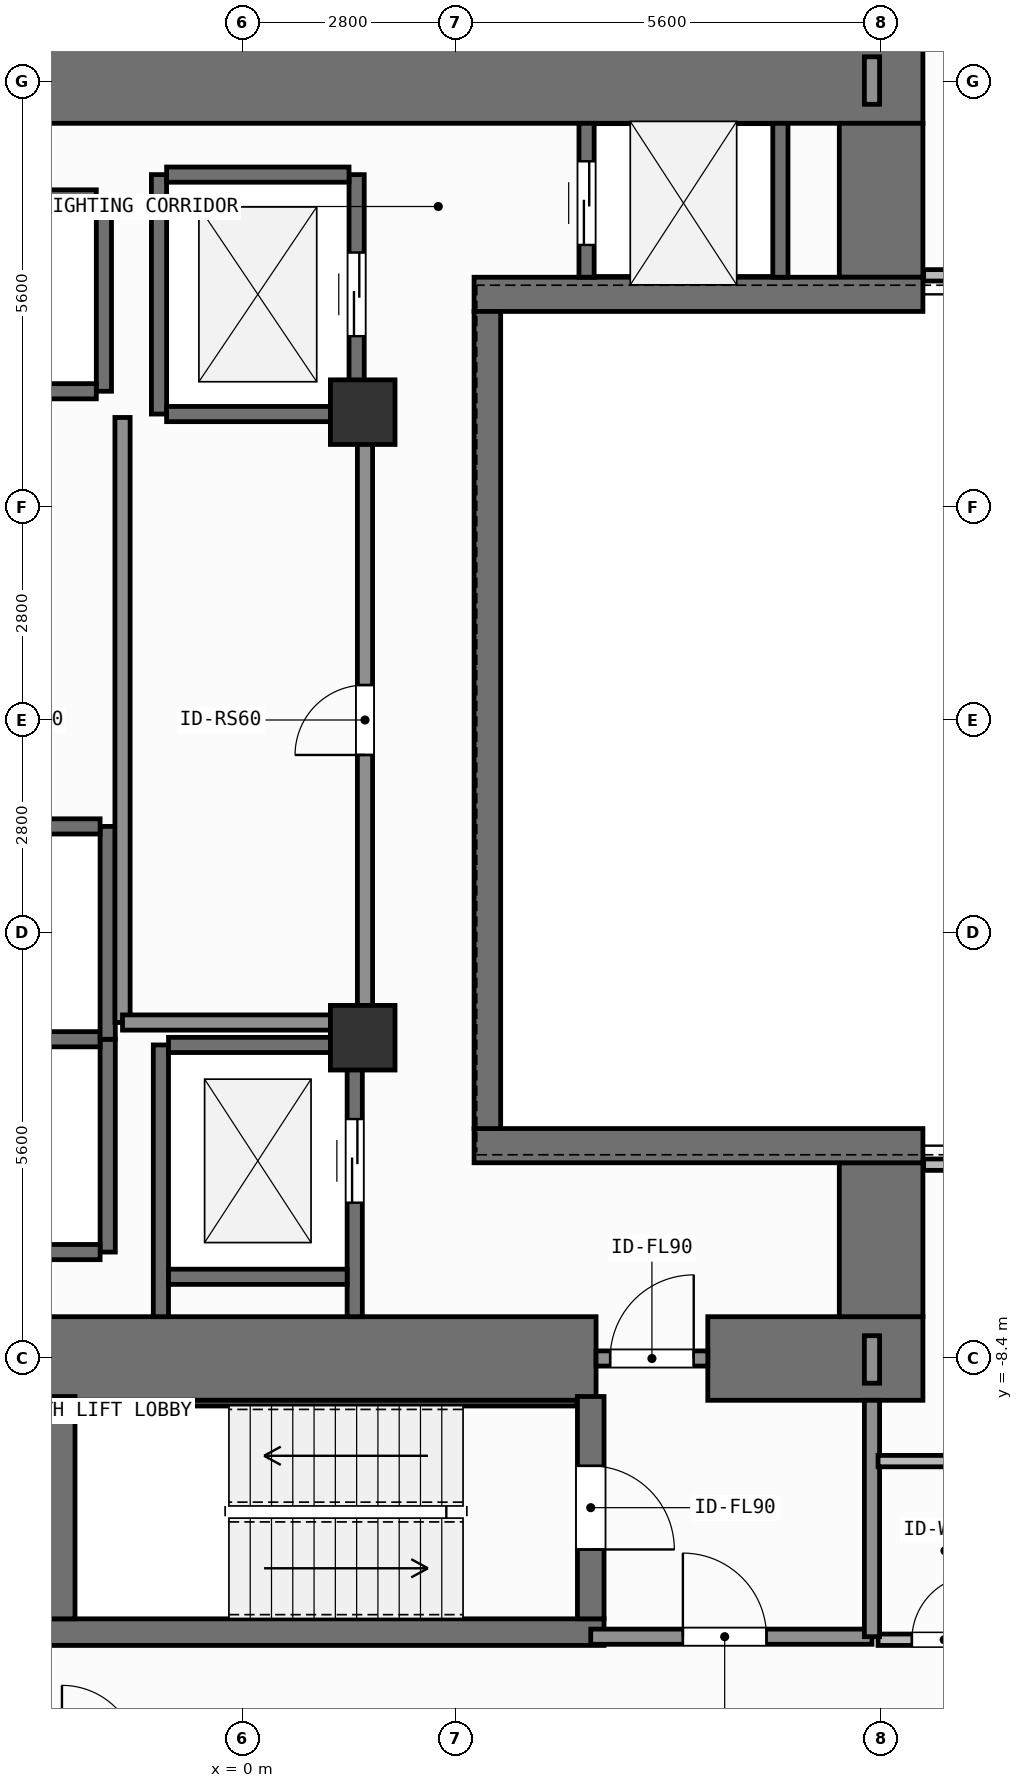
"""IFC4 building model, lengths in metres.
Left out: names, types, materials, properties, quantities, classifications, styles, units other than length and angle.
Written with IfcOpenShell. Run it as: python <this file> out.ifc"""

import sys

from ifc_helpers import new_model, si_unit, direction, frame, frame_2d, origin, origin_2d, place, context, subcontext, project, spatial, rectangle, extrude, element, fill, save


model = new_model("IFC4")
c1 = context("Model", 3, precision=1e-05, world=origin(), true_north=direction((0.0, 1.0)))
c2 = subcontext(c1, "Body", "Model", "MODEL_VIEW")
j1 = project(units=[si_unit("LENGTHUNIT", "METRE"), si_unit("PLANEANGLEUNIT", "RADIAN")], contexts=[c1])
p1 = place(None, origin())
s1 = spatial("IfcSite", under=j1, at=p1, CompositionType="ELEMENT")
p2 = place(p1, origin())
s2 = spatial("IfcBuilding", under=s1, at=p2, CompositionType="ELEMENT")
p3 = place(p2, frame((0.0, 0.0, 61.8)))
s3 = spatial("IfcBuildingStorey", under=s2, at=p3, CompositionType="ELEMENT", Elevation=61.8)
p4 = place(p3, frame((-2.62, -8.4, 0.0), z_axis=(0.0, 0.0, 1.0), x_axis=(1.0, 0.0, 0.0)))
e1 = element("IfcWall", 1, at=p4, inside=s3, PredefinedType="SHEAR", context=c2, shape_type="SweptSolid", body=[
    extrude(rectangle(XDim=7.27, YDim=1.1, at=frame_2d((3.635, 0.0))), origin(), (0.0, 0.0, 1.0), 3.9),
])
p5 = place(p3, frame((6.12, -8.4, 0.0), z_axis=(0.0, 0.0, 1.0), x_axis=(1.0, 0.0, 0.0)))
e2 = element("IfcWall", 2, at=p5, inside=s3, PredefinedType="SHEAR", context=c2, shape_type="SweptSolid", body=[
    extrude(rectangle(XDim=2.83, YDim=1.1, at=frame_2d((1.415, 0.0))), origin(), (0.0, 0.0, 1.0), 3.9),
])
p6 = place(p3, frame((-7.55, 8.4, 0.0), z_axis=(0.0, 0.0, 1.0), x_axis=(1.0, 0.0, 0.0)))
e3 = element("IfcWall", 3, at=p6, inside=s3, PredefinedType="SHEAR", context=c2, shape_type="SweptSolid", body=[
    extrude(rectangle(XDim=16.5, YDim=1.1, at=frame_2d((8.25, 0.0))), origin(), (0.0, 0.0, 1.0), 3.9),
])
for number, where, z_axis, x_axis in (
    (4, (8.4, -7.85, 0.0), (0.0, 0.0, 1.0), (0.0, 1.0, 0.0)),
    (5, (8.4, 5.825, 0.0), (0.0, 0.0, 1.0), (0.0, 1.0, 0.0)),
):
    element("IfcWall", number, at=place(p3, frame(where, z_axis=z_axis, x_axis=x_axis)), inside=s3, PredefinedType="SHEAR", context=c2, shape_type="SweptSolid", body=[
        extrude(rectangle(XDim=2.025, YDim=1.1, at=frame_2d((1.013, 0.0))), origin(), (0.0, 0.0, 1.0), 3.9),
    ])
for number, where, z_axis, x_axis in (
    (6, (3.045, -5.6, 0.0), (0.0, 0.0, 1.0), (1.0, 0.0, 0.0)),
    (7, (3.045, 5.6, 0.0), (0.0, 0.0, 1.0), (1.0, 0.0, 0.0)),
):
    element("IfcWall", number, at=place(p3, frame(where, z_axis=z_axis, x_axis=x_axis)), inside=s3, PredefinedType="SHEAR", context=c2, shape_type="SweptSolid", body=[
        extrude(rectangle(XDim=5.905, YDim=0.45, at=frame_2d((2.953, 0.0))), origin(), (0.0, 0.0, 1.0), 3.9),
    ])
p7 = place(p3, frame((3.22, -5.375, 0.0), z_axis=(0.0, 0.0, 1.0), x_axis=(0.0, 1.0, 0.0)))
e8 = element("IfcWall", 8, at=p7, inside=s3, PredefinedType="SHEAR", context=c2, shape_type="SweptSolid", body=[
    extrude(rectangle(XDim=10.75, YDim=0.35, at=frame_2d((5.375, 0.0))), origin(), (0.0, 0.0, 1.0), 3.9),
])
p8 = place(p3, frame((-2.555, -12.0, 0.0), z_axis=(0.0, 0.0, 1.0), x_axis=(1.0, 0.0, 0.0)))
e9 = element("IfcWall", 9, at=p8, inside=s3, PredefinedType="SHEAR", context=c2, shape_type="SweptSolid", body=[
    extrude(rectangle(XDim=7.31, YDim=0.35, at=frame_2d((3.655, 0.0))), origin(), (0.0, 0.0, 1.0), 3.9),
])
p9 = place(p3, frame((-2.2, -8.988, 0.0), z_axis=(0.0, 0.0, 1.0), x_axis=(1.0, 0.0, 0.0)))
e10 = element("IfcWall", 10, at=p9, inside=s3, PredefinedType="SHEAR", context=c2, shape_type="SweptSolid", body=[
    extrude(rectangle(XDim=6.6, YDim=0.075, at=frame_2d((3.3, 0.0))), origin(), (0.0, 0.0, 1.0), 3.9),
])
p10 = place(p3, frame((-2.38, -11.825, 0.0), z_axis=(0.0, 0.0, 1.0), x_axis=(0.0, 1.0, 0.0)))
e11 = element("IfcWall", 11, at=p10, inside=s3, PredefinedType="SHEAR", context=c2, shape_type="SweptSolid", body=[
    extrude(rectangle(XDim=2.925, YDim=0.35, at=frame_2d((1.462, 0.0))), origin(), (0.0, 0.0, 1.0), 3.9),
])
p11 = place(p3, frame((4.58, -8.9, 0.0), z_axis=(0.0, 0.0, 1.0), x_axis=(0.0, -1.0, 0.0)))
e12 = element("IfcWall", 12, at=p11, inside=s3, PredefinedType="SHEAR", context=c2, shape_type="SweptSolid", body=[
    extrude(rectangle(XDim=2.925, YDim=0.35, at=frame_2d((1.462, 0.0))), origin(), (0.0, 0.0, 1.0), 3.9),
])
p12 = place(p11, frame((0.913, 0.0, 0.0)))
e13 = element("IfcOpeningElement", 13, at=p12, cuts=e12, PredefinedType="OPENING", context=c2, shape_type="SweptSolid", body=[
    extrude(rectangle(XDim=1.1, YDim=2.15, at=frame_2d((0.55, 1.075))), frame((0.0, 0.185, 0.0), z_axis=(0.0, -1.0, 0.0), x_axis=(1.0, 0.0, 0.0)), (0.0, 0.0, 1.0), 0.37),
])
for number, where, z_axis, x_axis in (
    (14, (1.58, -4.18, 0.0), (0.0, 0.0, 1.0), (1.0, 0.0, 0.0)),
    (15, (1.58, 4.05, 0.0), (0.0, 0.0, 1.0), (1.0, 0.0, 0.0)),
):
    element("IfcColumn", number, at=place(p3, frame(where, z_axis=z_axis, x_axis=x_axis)), inside=s3, PredefinedType="COLUMN", context=c2, shape_type="SweptSolid", body=[
        extrude(rectangle(XDim=0.85, YDim=0.85, at=origin_2d()), origin(), (0.0, 0.0, 1.0), 3.9),
    ])
p13 = place(p3, frame((-1.825, 4.325, 0.0), z_axis=(0.0, 0.0, 1.0), x_axis=(0.0, 1.0, 0.0)))
e16 = element("IfcWall", 16, at=p13, inside=s3, PredefinedType="SHEAR", context=c2, shape_type="SweptSolid", body=[
    extrude(rectangle(XDim=2.55, YDim=0.2, at=frame_2d((1.275, 0.0))), origin(), (0.0, 0.0, 1.0), 3.68),
])
for number, where, z_axis, x_axis in (
    (17, (-4.275, 4.325, 0.0), (0.0, 0.0, 1.0), (1.0, 0.0, 0.0)),
    (18, (-4.275, 6.875, 0.0), (0.0, 0.0, 1.0), (1.0, 0.0, 0.0)),
):
    element("IfcWall", number, at=place(p3, frame(where, z_axis=z_axis, x_axis=x_axis)), inside=s3, PredefinedType="SHEAR", context=c2, shape_type="SweptSolid", body=[
        extrude(rectangle(XDim=2.35, YDim=0.2, at=frame_2d((1.175, 0.0))), origin(), (0.0, 0.0, 1.0), 3.68),
    ])
p14 = place(p3, frame((-1.775, -7.0, 0.0), z_axis=(0.0, 0.0, 1.0), x_axis=(0.0, 1.0, 0.0)))
e19 = element("IfcWall", 19, at=p14, inside=s3, PredefinedType="SHEAR", context=c2, shape_type="SweptSolid", body=[
    extrude(rectangle(XDim=2.8, YDim=0.2, at=frame_2d((1.4, 0.0))), origin(), (0.0, 0.0, 1.0), 3.68),
])
for number, where, z_axis, x_axis in (
    (20, (-4.325, -7.0, 0.0), (0.0, 0.0, 1.0), (1.0, 0.0, 0.0)),
    (21, (-4.325, -4.2, 0.0), (0.0, 0.0, 1.0), (1.0, 0.0, 0.0)),
):
    element("IfcWall", number, at=place(p3, frame(where, z_axis=z_axis, x_axis=x_axis)), inside=s3, PredefinedType="SHEAR", context=c2, shape_type="SweptSolid", body=[
        extrude(rectangle(XDim=2.45, YDim=0.2, at=frame_2d((1.225, 0.0))), origin(), (0.0, 0.0, 1.0), 3.68),
    ])
p15 = place(p3, frame((-1.775, -4.2, 0.0), z_axis=(0.0, 0.0, 1.0), x_axis=(0.0, 1.0, 0.0)))
e22 = element("IfcWall", 22, at=p15, inside=s3, PredefinedType="SHEAR", context=c2, shape_type="SweptSolid", body=[
    extrude(rectangle(XDim=2.8, YDim=0.2, at=frame_2d((1.4, 0.0))), origin(), (0.0, 0.0, 1.0), 3.68),
])
p16 = place(p3, frame((-4.325, -1.4, 0.0), z_axis=(0.0, 0.0, 1.0), x_axis=(1.0, 0.0, 0.0)))
e23 = element("IfcWall", 23, at=p16, inside=s3, PredefinedType="SHEAR", context=c2, shape_type="SweptSolid", body=[
    extrude(rectangle(XDim=2.45, YDim=0.2, at=frame_2d((1.225, 0.0))), origin(), (0.0, 0.0, 1.0), 3.68),
])
p17 = place(p3, frame((-1.1, 4.025, 0.0), z_axis=(0.0, 0.0, 1.0), x_axis=(0.0, 1.0, 0.0)))
e24 = element("IfcWall", 24, at=p17, inside=s3, PredefinedType="SHEAR", context=c2, shape_type="SweptSolid", body=[
    extrude(rectangle(XDim=3.15, YDim=0.2, at=frame_2d((1.575, 0.0))), origin(), (0.0, 0.0, 1.0), 3.68),
])
p18 = place(p3, frame((1.5, 4.025, 0.0), z_axis=(0.0, 0.0, 1.0), x_axis=(0.0, 1.0, 0.0)))
e25 = element("IfcWall", 25, at=p18, inside=s3, PredefinedType="SHEAR", context=c2, shape_type="SweptSolid", body=[
    extrude(rectangle(XDim=3.15, YDim=0.2, at=frame_2d((1.575, 0.0))), origin(), (0.0, 0.0, 1.0), 3.68),
])
p19 = place(p18, frame((1.025, 0.0, 0.0)))
e26 = element("IfcOpeningElement", 26, at=p19, cuts=e25, PredefinedType="OPENING", context=c2, shape_type="SweptSolid", body=[
    extrude(rectangle(XDim=1.1, YDim=2.2, at=frame_2d((0.55, 1.1))), frame((0.0, 0.11, 0.0), z_axis=(0.0, -1.0, 0.0), x_axis=(1.0, 0.0, 0.0)), (0.0, 0.0, 1.0), 0.22),
])
for number, where, z_axis, x_axis in (
    (27, (-1.0, 4.025, 0.0), (0.0, 0.0, 1.0), (1.0, 0.0, 0.0)),
    (28, (-1.0, 7.175, 0.0), (0.0, 0.0, 1.0), (1.0, 0.0, 0.0)),
):
    element("IfcWall", number, at=place(p3, frame(where, z_axis=z_axis, x_axis=x_axis)), inside=s3, PredefinedType="SHEAR", context=c2, shape_type="SweptSolid", body=[
        extrude(rectangle(XDim=2.4, YDim=0.2, at=frame_2d((1.2, 0.0))), origin(), (0.0, 0.0, 1.0), 3.68),
    ])
p20 = place(p3, frame((-1.075, -7.85, 0.0), z_axis=(0.0, 0.0, 1.0), x_axis=(0.0, 1.0, 0.0)))
e29 = element("IfcWall", 29, at=p20, inside=s3, PredefinedType="SHEAR", context=c2, shape_type="SweptSolid", body=[
    extrude(rectangle(XDim=3.575, YDim=0.2, at=frame_2d((1.788, 0.0))), origin(), (0.0, 0.0, 1.0), 3.68),
])
p21 = place(p3, frame((1.475, -7.85, 0.0), z_axis=(0.0, 0.0, 1.0), x_axis=(0.0, 1.0, 0.0)))
e30 = element("IfcWall", 30, at=p21, inside=s3, PredefinedType="SHEAR", context=c2, shape_type="SweptSolid", body=[
    extrude(rectangle(XDim=3.575, YDim=0.2, at=frame_2d((1.788, 0.0))), origin(), (0.0, 0.0, 1.0), 3.68),
])
p22 = place(p21, frame((1.5, 0.0, 0.0)))
e31 = element("IfcOpeningElement", 31, at=p22, cuts=e30, PredefinedType="OPENING", context=c2, shape_type="SweptSolid", body=[
    extrude(rectangle(XDim=1.1, YDim=2.2, at=frame_2d((0.55, 1.1))), frame((0.0, 0.11, 0.0), z_axis=(0.0, -1.0, 0.0), x_axis=(1.0, 0.0, 0.0)), (0.0, 0.0, 1.0), 0.22),
])
for number, where, z_axis, x_axis in (
    (32, (-0.975, -7.325, 0.0), (0.0, 0.0, 1.0), (1.0, 0.0, 0.0)),
    (33, (-0.975, -4.275, 0.0), (0.0, 0.0, 1.0), (1.0, 0.0, 0.0)),
):
    element("IfcWall", number, at=place(p3, frame(where, z_axis=z_axis, x_axis=x_axis)), inside=s3, PredefinedType="SHEAR", context=c2, shape_type="SweptSolid", body=[
        extrude(rectangle(XDim=2.35, YDim=0.2, at=frame_2d((1.175, 0.0))), origin(), (0.0, 0.0, 1.0), 3.68),
    ])
p23 = place(p3, frame((4.525, 5.825, 0.0), z_axis=(0.0, 0.0, 1.0), x_axis=(0.0, 1.0, 0.0)))
e34 = element("IfcWall", 34, at=p23, inside=s3, PredefinedType="SHEAR", context=c2, shape_type="SweptSolid", body=[
    extrude(rectangle(XDim=2.025, YDim=0.2, at=frame_2d((1.013, 0.0))), origin(), (0.0, 0.0, 1.0), 3.68),
])
p24 = place(p23, frame((0.425, 0.0, 0.0)))
e35 = element("IfcOpeningElement", 35, at=p24, cuts=e34, PredefinedType="OPENING", context=c2, shape_type="SweptSolid", body=[
    extrude(rectangle(XDim=1.1, YDim=2.2, at=frame_2d((0.55, 1.1))), frame((0.0, 0.11, 0.0), z_axis=(0.0, -1.0, 0.0), x_axis=(1.0, 0.0, 0.0)), (0.0, 0.0, 1.0), 0.22),
])
p25 = place(p3, frame((7.075, 5.825, 0.0), z_axis=(0.0, 0.0, 1.0), x_axis=(0.0, 1.0, 0.0)))
e36 = element("IfcWall", 36, at=p25, inside=s3, PredefinedType="SHEAR", context=c2, shape_type="SweptSolid", body=[
    extrude(rectangle(XDim=2.025, YDim=0.2, at=frame_2d((1.013, 0.0))), origin(), (0.0, 0.0, 1.0), 3.68),
])
p26 = place(p3, frame((4.58, -12.06, 0.0), z_axis=(0.0, 0.0, 1.0), x_axis=(1.0, 0.0, 0.0)))
e37 = element("IfcWall", 37, at=p26, inside=s3, PredefinedType="SOLIDWALL", context=c2, shape_type="SweptSolid", body=[
    extrude(rectangle(XDim=3.7, YDim=0.2, at=frame_2d((1.85, 0.0))), origin(), (0.0, 0.0, 1.0), 3.68),
])
p27 = place(p26, frame((1.212, 0.0, 0.0)))
e38 = element("IfcOpeningElement", 38, at=p27, cuts=e37, PredefinedType="OPENING", context=c2, shape_type="SweptSolid", body=[
    extrude(rectangle(XDim=1.1, YDim=2.15, at=frame_2d((0.55, 1.075))), frame((0.0, 0.11, 0.0), z_axis=(0.0, -1.0, 0.0), x_axis=(1.0, 0.0, 0.0)), (0.0, 0.0, 1.0), 0.22),
])
p28 = place(p3, frame((4.65, -8.4, 0.0), z_axis=(0.0, 0.0, 1.0), x_axis=(1.0, 0.0, 0.0)))
e39 = element("IfcWall", 39, at=p28, inside=s3, PredefinedType="SOLIDWALL", context=c2, shape_type="SweptSolid", body=[
    extrude(rectangle(XDim=1.47, YDim=0.2, at=frame_2d((0.735, 0.0))), origin(), (0.0, 0.0, 1.0), 2.72),
])
p29 = place(p28, frame((0.185, 0.0, 0.0)))
e40 = element("IfcOpeningElement", 40, at=p29, cuts=e39, PredefinedType="OPENING", context=c2, shape_type="SweptSolid", body=[
    extrude(rectangle(XDim=1.1, YDim=2.15, at=frame_2d((0.55, 1.075))), frame((0.0, 0.11, 0.0), z_axis=(0.0, -1.0, 0.0), x_axis=(1.0, 0.0, 0.0)), (0.0, 0.0, 1.0), 0.22),
])
p30 = place(p3, frame((1.61, -3.98, 0.0), z_axis=(0.0, 0.0, 1.0), x_axis=(0.0, 1.0, 0.0)))
e41 = element("IfcWall", 41, at=p30, inside=s3, PredefinedType="SOLIDWALL", context=c2, shape_type="SweptSolid", body=[
    extrude(rectangle(XDim=7.96, YDim=0.2, at=frame_2d((3.98, 0.0))), origin(), (0.0, 0.0, 1.0), 3.68),
])
p31 = place(p30, frame((3.52, 0.0, 0.0)))
e42 = element("IfcOpeningElement", 42, at=p31, cuts=e41, PredefinedType="OPENING", context=c2, shape_type="SweptSolid", body=[
    extrude(rectangle(XDim=0.92, YDim=2.1, at=frame_2d((0.46, 1.05))), frame((0.0, 0.11, 0.0), z_axis=(0.0, -1.0, 0.0), x_axis=(1.0, 0.0, 0.0)), (0.0, 0.0, 1.0), 0.22),
])
p32 = place(p3, frame((8.36, -12.1, 0.0), z_axis=(0.0, 0.0, 1.0), x_axis=(1.0, 0.0, 0.0)))
e43 = element("IfcWall", 43, at=p32, inside=s3, PredefinedType="PARTITIONING", context=c2, shape_type="SweptSolid", body=[
    extrude(rectangle(XDim=1.74, YDim=0.15, at=frame_2d((0.87, 0.0))), origin(), (0.0, 0.0, 1.0), 3.68),
])
p33 = place(p32, frame((0.445, 0.0, 0.0)))
e44 = element("IfcOpeningElement", 44, at=p33, cuts=e43, PredefinedType="OPENING", context=c2, shape_type="SweptSolid", body=[
    extrude(rectangle(XDim=0.85, YDim=2.1, at=frame_2d((0.425, 1.05))), frame((0.0, 0.085, 0.0), z_axis=(0.0, -1.0, 0.0), x_axis=(1.0, 0.0, 0.0)), (0.0, 0.0, 1.0), 0.17),
])
p34 = place(p3, frame((8.28, -12.06, 0.0), z_axis=(0.0, 0.0, 1.0), x_axis=(0.0, 1.0, 0.0)))
e45 = element("IfcWall", 45, at=p34, inside=s3, PredefinedType="SOLIDWALL", context=c2, shape_type="SweptSolid", body=[
    extrude(rectangle(XDim=3.11, YDim=0.2, at=frame_2d((1.555, 0.0))), origin(), (0.0, 0.0, 1.0), 3.68),
])
p35 = place(p3, frame((-1.58, -3.98, 0.0), z_axis=(0.0, 0.0, 1.0), x_axis=(0.0, 1.0, 0.0)))
e46 = element("IfcWall", 46, at=p35, inside=s3, PredefinedType="SOLIDWALL", context=c2, shape_type="SweptSolid", body=[
    extrude(rectangle(XDim=7.96, YDim=0.2, at=frame_2d((3.98, 0.0))), origin(), (0.0, 0.0, 1.0), 3.68),
])
p36 = place(p3, frame((-1.58, -3.98, 0.0), z_axis=(0.0, 0.0, 1.0), x_axis=(1.0, 0.0, 0.0)))
e47 = element("IfcWall", 47, at=p36, inside=s3, PredefinedType="SOLIDWALL", context=c2, shape_type="SweptSolid", body=[
    extrude(rectangle(XDim=3.19, YDim=0.2, at=frame_2d((1.595, 0.0))), origin(), (0.0, 0.0, 1.0), 3.68),
])
p37 = place(p3, frame((8.28, -8.725, 0.0), z_axis=(0.0, 0.0, 1.0), x_axis=(0.0, 1.0, 0.0)))
e48 = element("IfcWall", 48, at=p37, inside=s3, PredefinedType="SOLIDWALL", context=c2, shape_type="SweptSolid", body=[
    extrude(rectangle(XDim=0.625, YDim=0.2, at=frame_2d((0.312, 0.0))), origin(), (0.0, 0.0, 1.0), 3.68),
])
p38 = place(p3, frame((8.36, -9.75, 0.0), z_axis=(0.0, 0.0, 1.0), x_axis=(1.0, 0.0, 0.0)))
e49 = element("IfcWall", 49, at=p38, inside=s3, PredefinedType="PARTITIONING", context=c2, shape_type="SweptSolid", body=[
    extrude(rectangle(XDim=1.74, YDim=0.15, at=frame_2d((0.87, 0.0))), origin(), (0.0, 0.0, 1.0), 3.68),
])
p39 = place(p3, frame((8.96, -5.85, 0.0), z_axis=(0.0, 0.0, 1.0), x_axis=(1.0, 0.0, 0.0)))
e50 = element("IfcWall", 50, at=p39, inside=s3, PredefinedType="PARTITIONING", context=c2, shape_type="SweptSolid", body=[
    extrude(rectangle(XDim=6.62, YDim=0.15, at=frame_2d((3.31, 0.0))), origin(), (0.0, 0.0, 1.0), 3.68),
])
p40 = place(p3, frame((8.28, 8.1, 0.0), z_axis=(0.0, 0.0, 1.0), x_axis=(0.0, 1.0, 0.0)))
e51 = element("IfcWall", 51, at=p40, inside=s3, PredefinedType="SOLIDWALL", context=c2, shape_type="SweptSolid", body=[
    extrude(rectangle(XDim=0.625, YDim=0.2, at=frame_2d((0.312, 0.0))), origin(), (0.0, 0.0, 1.0), 3.68),
])
p41 = place(p3, frame((8.96, 5.85, 0.0), z_axis=(0.0, 0.0, 1.0), x_axis=(1.0, 0.0, 0.0)))
e52 = element("IfcWall", 52, at=p41, inside=s3, PredefinedType="PARTITIONING", context=c2, shape_type="SweptSolid", body=[
    extrude(rectangle(XDim=6.62, YDim=0.15, at=frame_2d((3.31, 0.0))), origin(), (0.0, 0.0, 1.0), 3.68),
])
p42 = place(p19, origin())
e53 = element("IfcDoor", 53, at=p42, inside=s3, OperationType="SLIDING_TO_LEFT", PredefinedType="DOOR", context=c2, shape_type="SweptSolid", body=[
    extrude(rectangle(XDim=1.1, YDim=2.2, at=frame_2d((0.55, 1.1))), frame((0.0, 0.025, 0.0), z_axis=(0.0, -1.0, 0.0), x_axis=(1.0, 0.0, 0.0)), (0.0, 0.0, 1.0), 0.05),
])
fill(e26, e53)
p43 = place(p22, origin())
e54 = element("IfcDoor", 54, at=p43, inside=s3, OperationType="SLIDING_TO_LEFT", PredefinedType="DOOR", context=c2, shape_type="SweptSolid", body=[
    extrude(rectangle(XDim=1.1, YDim=2.2, at=frame_2d((0.55, 1.1))), frame((0.0, 0.025, 0.0), z_axis=(0.0, -1.0, 0.0), x_axis=(1.0, 0.0, 0.0)), (0.0, 0.0, 1.0), 0.05),
])
fill(e31, e54)
p44 = place(p24, origin())
e55 = element("IfcDoor", 55, at=p44, inside=s3, OperationType="SLIDING_TO_LEFT", PredefinedType="DOOR", context=c2, shape_type="SweptSolid", body=[
    extrude(rectangle(XDim=1.1, YDim=2.2, at=frame_2d((0.55, 1.1))), frame((0.0, 0.025, 0.0), z_axis=(0.0, -1.0, 0.0), x_axis=(1.0, 0.0, 0.0)), (0.0, 0.0, 1.0), 0.05),
])
fill(e35, e55)
p45 = place(p12, origin())
e56 = element("IfcDoor", 56, at=p45, inside=s3, OperationType="SINGLE_SWING_RIGHT", PredefinedType="DOOR", context=c2, shape_type="SweptSolid", body=[
    extrude(rectangle(XDim=1.1, YDim=2.15, at=frame_2d((0.55, 1.075))), frame((0.0, 0.025, 0.0), z_axis=(0.0, -1.0, 0.0), x_axis=(1.0, 0.0, 0.0)), (0.0, 0.0, 1.0), 0.05),
])
fill(e13, e56)
p46 = place(p27, origin())
e57 = element("IfcDoor", 57, at=p46, inside=s3, OperationType="SINGLE_SWING_LEFT", PredefinedType="DOOR", context=c2, shape_type="SweptSolid", body=[
    extrude(rectangle(XDim=1.1, YDim=2.15, at=frame_2d((0.55, 1.075))), frame((0.0, 0.025, 0.0), z_axis=(0.0, -1.0, 0.0), x_axis=(1.0, 0.0, 0.0)), (0.0, 0.0, 1.0), 0.05),
])
fill(e38, e57)
p47 = place(p29, origin())
e58 = element("IfcDoor", 58, at=p47, inside=s3, OperationType="SINGLE_SWING_RIGHT", PredefinedType="DOOR", context=c2, shape_type="SweptSolid", body=[
    extrude(rectangle(XDim=1.1, YDim=2.15, at=frame_2d((0.55, 1.075))), frame((0.0, 0.025, 0.0), z_axis=(0.0, -1.0, 0.0), x_axis=(1.0, 0.0, 0.0)), (0.0, 0.0, 1.0), 0.05),
])
fill(e40, e58)
p48 = place(p31, origin())
e59 = element("IfcDoor", 59, at=p48, inside=s3, OperationType="SINGLE_SWING_LEFT", PredefinedType="DOOR", context=c2, shape_type="SweptSolid", body=[
    extrude(rectangle(XDim=0.92, YDim=2.1, at=frame_2d((0.46, 1.05))), frame((0.0, 0.025, 0.0), z_axis=(0.0, -1.0, 0.0), x_axis=(1.0, 0.0, 0.0)), (0.0, 0.0, 1.0), 0.05),
])
fill(e42, e59)
p49 = place(p33, origin())
e60 = element("IfcDoor", 60, at=p49, inside=s3, OperationType="SINGLE_SWING_RIGHT", PredefinedType="DOOR", context=c2, shape_type="SweptSolid", body=[
    extrude(rectangle(XDim=0.85, YDim=2.1, at=frame_2d((0.425, 1.05))), frame((0.0, 0.025, 0.0), z_axis=(0.0, -1.0, 0.0), x_axis=(1.0, 0.0, 0.0)), (0.0, 0.0, 1.0), 0.05),
])
fill(e44, e60)
save(model, sys.argv[1])
